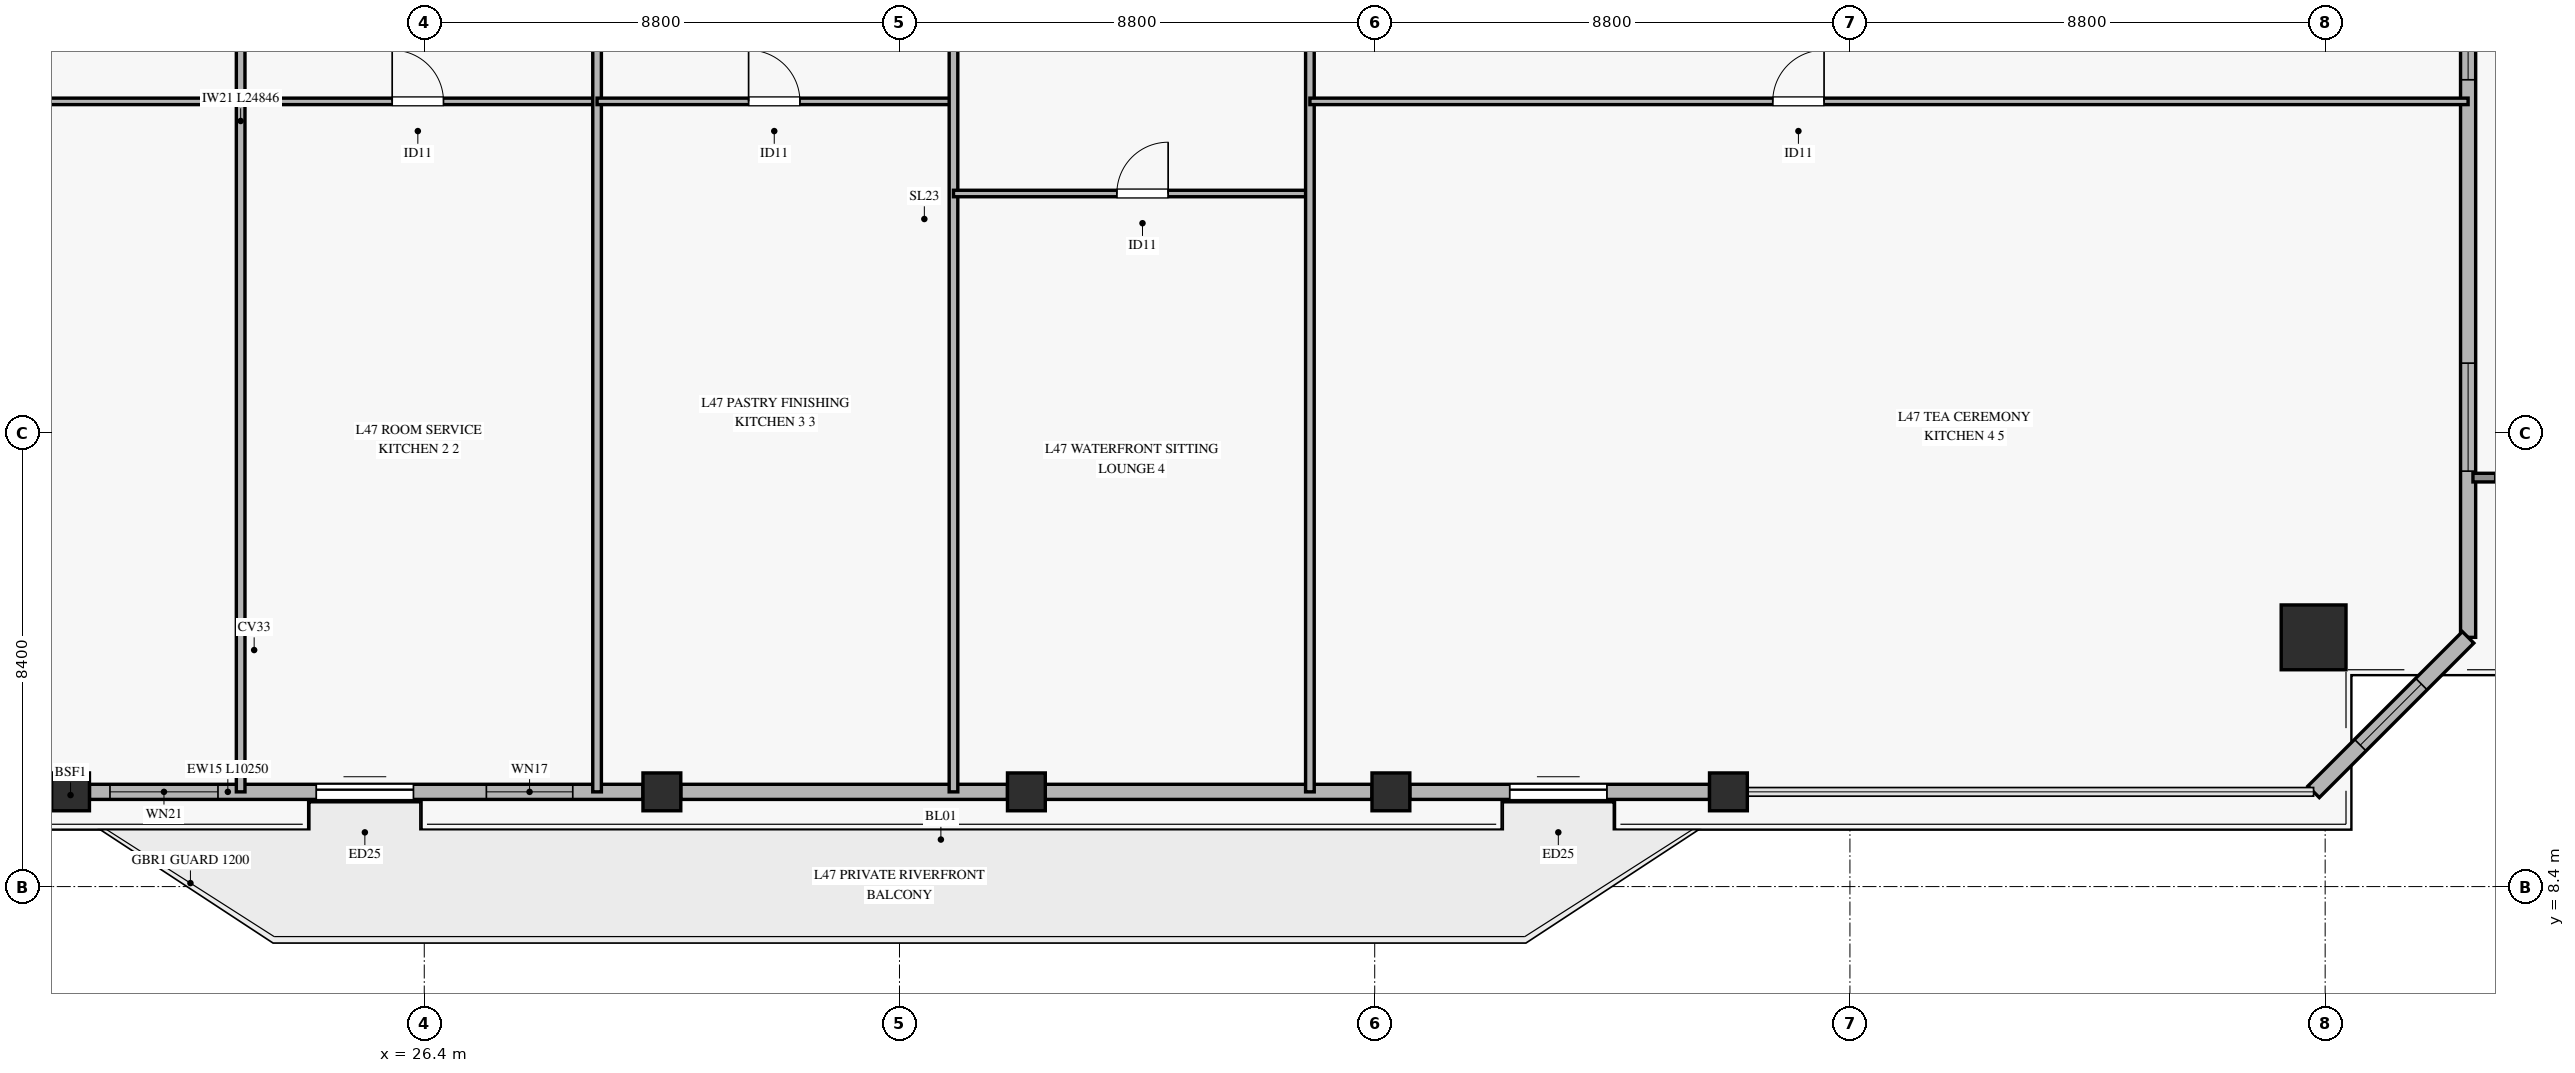
"""IFC4 building model, lengths in metres.
Left out: names, types, materials, properties, quantities, classifications, styles, units other than length and angle.
Written with IfcOpenShell. Run it as: python <this file> out.ifc"""

import sys

from ifc_helpers import new_model, si_unit, direction, frame, frame_2d, origin, origin_2d, place, context, subcontext, project, spatial, rectangle, hollow_rectangle, extrude, source, transform, mapped, element, fill, save


model = new_model("IFC4")
c1 = context("Model", 3, precision=1e-05, world=origin(), true_north=direction((0.0, 1.0)))
c2 = subcontext(c1, "Body", "Model", "MODEL_VIEW")
j1 = project(units=[si_unit("LENGTHUNIT", "METRE"), si_unit("PLANEANGLEUNIT", "RADIAN")], contexts=[c1])
p1 = place(None, origin())
s1 = spatial("IfcSite", under=j1, at=p1, CompositionType="ELEMENT")
p2 = place(p1, origin())
s2 = spatial("IfcBuilding", under=s1, at=p2, CompositionType="ELEMENT")
p3 = place(p2, frame((0.0, 0.0, 187.7)))
s3 = spatial("IfcBuildingStorey", under=s2, at=p3, CompositionType="ELEMENT", Elevation=187.7)
m1 = source(origin(), c2, "Body", "SweptSolid", [
    extrude(hollow_rectangle(XDim=1.2, YDim=1.2, WallThickness=0.055, at=origin_2d()), origin(), (0.0, 0.0, 1.0), 3.265),
])
p4 = place(p3, frame((61.386, 13.015, 0.0), z_axis=(-0.06400248014, 0.15312742912, 0.986131671222), x_axis=(-0.922649834668, -0.385638798084, 0.0)))
e1 = element("IfcColumn", 1, at=p4, inside=s3, PredefinedType="COLUMN", context=c2, shape_type="MappedRepresentation", body=[
    mapped(m1, transform((0.0, 0.0, 0.0), x_axis=(1.0, 0.0, 0.0), y_axis=(0.0, 1.0, 0.0), z_axis=(0.0, 0.0, 1.0), scale=1.0)),
])
m2 = source(origin(), c2, "Body", "SweptSolid", [
    extrude(hollow_rectangle(XDim=0.7, YDim=0.7, WallThickness=0.032, at=origin_2d()), origin(), (0.0, 0.0, 1.0), 3.263),
])
for number, where, z_axis, x_axis in (
    (2, (19.85, 10.154, 0.0), (0.0, 0.161, 0.987), (-1.0, 0.0, 0.0)),
    (3, (30.8, 10.154, 0.0), (0.0, 0.161, 0.987), (-1.0, 0.0, 0.0)),
    (4, (37.55, 10.154, 0.0), (0.0, 0.161, 0.987), (-1.0, 0.0, 0.0)),
    (5, (44.3, 10.154, 0.0), (0.0, 0.161, 0.987), (-1.0, 0.0, 0.0)),
    (6, (50.55, 10.154, 0.0), (0.0, 0.161, 0.987), (-1.0, 0.0, 0.0)),
):
    element("IfcColumn", number, at=place(p3, frame(where, z_axis=z_axis, x_axis=x_axis)), inside=s3, PredefinedType="COLUMN", context=c2, shape_type="MappedRepresentation", body=[
        mapped(m2, transform((0.0, 0.0, 0.0), x_axis=(1.0, 0.0, 0.0), y_axis=(0.0, 1.0, 0.0), z_axis=(0.0, 0.0, 1.0), scale=1.0)),
    ])
p5 = place(p3, frame((20.2, 10.154, 0.0), z_axis=(0.0, 0.0, 1.0), x_axis=(1.0, 0.0, 0.0)))
e7 = element("IfcWall", 7, at=p5, inside=s3, PredefinedType="SOLIDWALL", context=c2, shape_type="SweptSolid", body=[
    extrude(rectangle(XDim=10.25, YDim=0.28, at=frame_2d((5.125, 0.0))), origin(), (0.0, 0.0, 1.0), 2.7),
])
p6 = place(p5, frame((4.2, 0.0, 0.0)))
e8 = element("IfcOpeningElement", 8, at=p6, cuts=e7, PredefinedType="OPENING", context=c2, shape_type="SweptSolid", body=[
    extrude(rectangle(XDim=1.8, YDim=2.25, at=frame_2d((0.9, 1.125))), frame((0.0, 0.15, 0.0), z_axis=(0.0, -1.0, 0.0), x_axis=(1.0, 0.0, 0.0)), (0.0, 0.0, 1.0), 0.3),
])
p7 = place(p5, frame((0.38, 0.0, 0.35)))
e9 = element("IfcOpeningElement", 9, at=p7, cuts=e7, PredefinedType="OPENING", context=c2, shape_type="SweptSolid", body=[
    extrude(rectangle(XDim=2.0, YDim=2.0, at=frame_2d((1.0, 1.0))), frame((0.0, 0.15, 0.0), z_axis=(0.0, -1.0, 0.0), x_axis=(1.0, 0.0, 0.0)), (0.0, 0.0, 1.0), 0.3),
])
p8 = place(p5, frame((7.35, 0.0, 0.35)))
e10 = element("IfcOpeningElement", 10, at=p8, cuts=e7, PredefinedType="OPENING", context=c2, shape_type="SweptSolid", body=[
    extrude(rectangle(XDim=1.6, YDim=2.0, at=frame_2d((0.8, 1.0))), frame((0.0, 0.15, 0.0), z_axis=(0.0, -1.0, 0.0), x_axis=(1.0, 0.0, 0.0)), (0.0, 0.0, 1.0), 0.3),
])
for number, where, z_axis, x_axis in (
    (11, (31.15, 10.154, 0.0), (0.0, 0.0, 1.0), (1.0, 0.0, 0.0)),
    (12, (37.9, 10.154, 0.0), (0.0, 0.0, 1.0), (1.0, 0.0, 0.0)),
):
    element("IfcWall", number, at=place(p3, frame(where, z_axis=z_axis, x_axis=x_axis)), inside=s3, PredefinedType="SOLIDWALL", context=c2, shape_type="SweptSolid", body=[
        extrude(rectangle(XDim=6.05, YDim=0.28, at=frame_2d((3.025, 0.0))), origin(), (0.0, 0.0, 1.0), 2.7),
    ])
p9 = place(p3, frame((44.65, 10.154, 0.0), z_axis=(0.0, 0.0, 1.0), x_axis=(1.0, 0.0, 0.0)))
e13 = element("IfcWall", 13, at=p9, inside=s3, PredefinedType="SOLIDWALL", context=c2, shape_type="SweptSolid", body=[
    extrude(rectangle(XDim=5.55, YDim=0.28, at=frame_2d((2.775, 0.0))), origin(), (0.0, 0.0, 1.0), 2.7),
])
p10 = place(p9, frame((1.85, 0.0, 0.0)))
e14 = element("IfcOpeningElement", 14, at=p10, cuts=e13, PredefinedType="OPENING", context=c2, shape_type="SweptSolid", body=[
    extrude(rectangle(XDim=1.8, YDim=2.25, at=frame_2d((0.9, 1.125))), frame((0.0, 0.15, 0.0), z_axis=(0.0, -1.0, 0.0), x_axis=(1.0, 0.0, 0.0)), (0.0, 0.0, 1.0), 0.3),
])
p11 = place(p3, frame((64.247, 13.015, 0.0), z_axis=(0.0, 0.0, 1.0), x_axis=(0.0, 1.0, 0.0)))
e15 = element("IfcWall", 15, at=p11, inside=s3, PredefinedType="SOLIDWALL", context=c2, shape_type="SweptSolid", body=[
    extrude(rectangle(XDim=14.762, YDim=0.28, at=frame_2d((7.381, 0.0))), origin(), (0.0, 0.0, 1.0), 2.7),
])
p12 = place(p11, frame((3.078, 0.0, 0.45)))
e16 = element("IfcOpeningElement", 16, at=p12, cuts=e15, PredefinedType="OPENING", context=c2, shape_type="SweptSolid", body=[
    extrude(rectangle(XDim=2.0, YDim=2.0, at=frame_2d((1.0, 1.0))), frame((0.0, 0.15, 0.0), z_axis=(0.0, -1.0, 0.0), x_axis=(1.0, 0.0, 0.0)), (0.0, 0.0, 1.0), 0.3),
])
p13 = place(p11, frame((10.325, 0.0, 0.45)))
e17 = element("IfcOpeningElement", 17, at=p13, cuts=e15, PredefinedType="OPENING", context=c2, shape_type="SweptSolid", body=[
    extrude(rectangle(XDim=2.0, YDim=2.0, at=frame_2d((1.0, 1.0))), frame((0.0, 0.15, 0.0), z_axis=(0.0, -1.0, 0.0), x_axis=(1.0, 0.0, 0.0)), (0.0, 0.0, 1.0), 0.3),
])
p14 = place(p3, frame((61.386, 10.154, 0.0), z_axis=(0.0, 0.0, 1.0), x_axis=(0.707136951076, 0.70707661001, 0.0)))
e18 = element("IfcWall", 18, at=p14, inside=s3, PredefinedType="SOLIDWALL", context=c2, shape_type="SweptSolid", body=[
    extrude(rectangle(XDim=4.046, YDim=0.3, at=frame_2d((2.023, 0.0))), origin(), (0.0, 0.0, 1.0), 2.7),
])
p15 = place(p14, frame((1.223, 0.0, 0.45)))
e19 = element("IfcOpeningElement", 19, at=p15, cuts=e18, PredefinedType="OPENING", context=c2, shape_type="SweptSolid", body=[
    extrude(rectangle(XDim=1.6, YDim=2.0, at=frame_2d((0.8, 1.0))), frame((0.0, 0.16, 0.0), z_axis=(0.0, -1.0, 0.0), x_axis=(1.0, 0.0, 0.0)), (0.0, 0.0, 1.0), 0.32),
])
p16 = place(p3, frame((6.154, 22.94, 0.0), z_axis=(0.0, 0.0, 1.0), x_axis=(1.0, 0.0, 0.0)))
e20 = element("IfcWall", 20, at=p16, inside=s3, PredefinedType="PARTITIONING", context=c2, shape_type="SweptSolid", body=[
    extrude(rectangle(XDim=16.846, YDim=0.12, at=frame_2d((8.423, 0.0))), origin(), (0.0, 0.0, 1.0), 2.405),
])
p17 = place(p16, frame((7.165, 0.0, 0.0)))
e21 = element("IfcOpeningElement", 21, at=p17, cuts=e20, PredefinedType="OPENING", context=c2, shape_type="SweptSolid", body=[
    extrude(rectangle(XDim=0.95, YDim=2.1, at=frame_2d((0.475, 1.05))), frame((0.0, 0.07, 0.0), z_axis=(0.0, -1.0, 0.0), x_axis=(1.0, 0.0, 0.0)), (0.0, 0.0, 1.0), 0.14),
])
p18 = place(p3, frame((23.0, 10.154, 0.0), z_axis=(0.0, 0.0, 1.0), x_axis=(0.0, 1.0, 0.0)))
e22 = element("IfcWall", 22, at=p18, inside=s3, PredefinedType="PARTITIONING", context=c2, shape_type="SweptSolid", body=[
    extrude(rectangle(XDim=24.846, YDim=0.16, at=frame_2d((12.423, 0.0))), origin(), (0.0, 0.0, 1.0), 2.705),
])
p19 = place(p3, frame((23.0, 22.94, 0.0), z_axis=(0.0, 0.0, 1.0), x_axis=(1.0, 0.0, 0.0)))
e23 = element("IfcWall", 23, at=p19, inside=s3, PredefinedType="PARTITIONING", context=c2, shape_type="SweptSolid", body=[
    extrude(rectangle(XDim=6.6, YDim=0.12, at=frame_2d((3.3, 0.0))), origin(), (0.0, 0.0, 1.0), 3.22),
])
p20 = place(p19, frame((2.806, 0.0, 0.0)))
e24 = element("IfcOpeningElement", 24, at=p20, cuts=e23, PredefinedType="OPENING", context=c2, shape_type="SweptSolid", body=[
    extrude(rectangle(XDim=0.95, YDim=2.1, at=frame_2d((0.475, 1.05))), frame((0.0, 0.07, 0.0), z_axis=(0.0, -1.0, 0.0), x_axis=(1.0, 0.0, 0.0)), (0.0, 0.0, 1.0), 0.14),
])
p21 = place(p3, frame((29.6, 10.154, 0.0), z_axis=(0.0, 0.0, 1.0), x_axis=(0.0, 1.0, 0.0)))
e25 = element("IfcWall", 25, at=p21, inside=s3, PredefinedType="PARTITIONING", context=c2, shape_type="SweptSolid", body=[
    extrude(rectangle(XDim=24.846, YDim=0.16, at=frame_2d((12.423, 0.0))), origin(), (0.0, 0.0, 1.0), 2.705),
])
p22 = place(p3, frame((29.6, 22.94, 0.0), z_axis=(0.0, 0.0, 1.0), x_axis=(1.0, 0.0, 0.0)))
e26 = element("IfcWall", 26, at=p22, inside=s3, PredefinedType="PARTITIONING", context=c2, shape_type="SweptSolid", body=[
    extrude(rectangle(XDim=6.6, YDim=0.12, at=frame_2d((3.3, 0.0))), origin(), (0.0, 0.0, 1.0), 2.405),
])
p23 = place(p22, frame((2.806, 0.0, 0.0)))
e27 = element("IfcOpeningElement", 27, at=p23, cuts=e26, PredefinedType="OPENING", context=c2, shape_type="SweptSolid", body=[
    extrude(rectangle(XDim=0.95, YDim=2.1, at=frame_2d((0.475, 1.05))), frame((0.0, 0.07, 0.0), z_axis=(0.0, -1.0, 0.0), x_axis=(1.0, 0.0, 0.0)), (0.0, 0.0, 1.0), 0.14),
])
p24 = place(p3, frame((36.2, 10.154, 0.0), z_axis=(0.0, 0.0, 1.0), x_axis=(0.0, 1.0, 0.0)))
e28 = element("IfcWall", 28, at=p24, inside=s3, PredefinedType="PARTITIONING", context=c2, shape_type="SweptSolid", body=[
    extrude(rectangle(XDim=24.846, YDim=0.16, at=frame_2d((12.423, 0.0))), origin(), (0.0, 0.0, 1.0), 2.705),
])
p25 = place(p3, frame((36.2, 21.234, 0.0), z_axis=(0.0, 0.0, 1.0), x_axis=(1.0, 0.0, 0.0)))
e29 = element("IfcWall", 29, at=p25, inside=s3, PredefinedType="PARTITIONING", context=c2, shape_type="SweptSolid", body=[
    extrude(rectangle(XDim=6.6, YDim=0.12, at=frame_2d((3.3, 0.0))), origin(), (0.0, 0.0, 1.0), 2.405),
])
p26 = place(p25, frame((3.025, 0.0, 0.0)))
e30 = element("IfcOpeningElement", 30, at=p26, cuts=e29, PredefinedType="OPENING", context=c2, shape_type="SweptSolid", body=[
    extrude(rectangle(XDim=0.95, YDim=2.1, at=frame_2d((0.475, 1.05))), frame((0.0, 0.07, 0.0), z_axis=(0.0, -1.0, 0.0), x_axis=(1.0, 0.0, 0.0)), (0.0, 0.0, 1.0), 0.14),
])
p27 = place(p3, frame((42.8, 10.154, 0.0), z_axis=(0.0, 0.0, 1.0), x_axis=(0.0, 1.0, 0.0)))
e31 = element("IfcWall", 31, at=p27, inside=s3, PredefinedType="PARTITIONING", context=c2, shape_type="SweptSolid", body=[
    extrude(rectangle(XDim=24.846, YDim=0.16, at=frame_2d((12.423, 0.0))), origin(), (0.0, 0.0, 1.0), 2.705),
])
p28 = place(p3, frame((42.8, 22.94, 0.0), z_axis=(0.0, 0.0, 1.0), x_axis=(1.0, 0.0, 0.0)))
e32 = element("IfcWall", 32, at=p28, inside=s3, PredefinedType="PARTITIONING", context=c2, shape_type="SweptSolid", body=[
    extrude(rectangle(XDim=21.447, YDim=0.12, at=frame_2d((10.724, 0.0))), origin(), (0.0, 0.0, 1.0), 2.405),
])
p29 = place(p28, frame((8.571, 0.0, 0.0)))
e33 = element("IfcOpeningElement", 33, at=p29, cuts=e32, PredefinedType="OPENING", context=c2, shape_type="SweptSolid", body=[
    extrude(rectangle(XDim=0.95, YDim=2.1, at=frame_2d((0.475, 1.05))), frame((0.0, 0.07, 0.0), z_axis=(0.0, -1.0, 0.0), x_axis=(1.0, 0.0, 0.0)), (0.0, 0.0, 1.0), 0.14),
])
m3 = source(origin(), c2, "Body", "SweptSolid", [
    extrude(rectangle(XDim=1.8, YDim=2.25, at=frame_2d((0.9, 1.125))), frame((0.0, 0.025, 0.0), z_axis=(0.0, -1.0, 0.0), x_axis=(1.0, 0.0, 0.0)), (0.0, 0.0, 1.0), 0.05),
])
p30 = place(p6, origin())
e34 = element("IfcDoor", 34, at=p30, inside=s3, OperationType="SLIDING_TO_LEFT", PredefinedType="DOOR", context=c2, shape_type="MappedRepresentation", body=[
    mapped(m3, transform((0.0, 0.0, 0.0), x_axis=(1.0, 0.0, 0.0), y_axis=(0.0, 1.0, 0.0), z_axis=(0.0, 0.0, 1.0), scale=1.0)),
])
fill(e8, e34)
m4 = source(origin(), c2, "Body", "SweptSolid", [
    extrude(rectangle(XDim=2.0, YDim=2.0, at=frame_2d((1.0, 1.0))), frame((0.0, 0.03, 0.0), z_axis=(0.0, -1.0, 0.0), x_axis=(1.0, 0.0, 0.0)), (0.0, 0.0, 1.0), 0.06),
])
p31 = place(p7, origin())
e35 = element("IfcWindow", 35, at=p31, inside=s3, PartitioningType="SINGLE_PANEL", PredefinedType="WINDOW", context=c2, shape_type="MappedRepresentation", body=[
    mapped(m4, transform((0.0, 0.0, 0.0), x_axis=(1.0, 0.0, 0.0), y_axis=(0.0, 1.0, 0.0), z_axis=(0.0, 0.0, 1.0), scale=1.0)),
])
fill(e9, e35)
m5 = source(origin(), c2, "Body", "SweptSolid", [
    extrude(rectangle(XDim=1.6, YDim=2.0, at=frame_2d((0.8, 1.0))), frame((0.0, 0.03, 0.0), z_axis=(0.0, -1.0, 0.0), x_axis=(1.0, 0.0, 0.0)), (0.0, 0.0, 1.0), 0.06),
])
p32 = place(p8, origin())
e36 = element("IfcWindow", 36, at=p32, inside=s3, PartitioningType="SINGLE_PANEL", PredefinedType="WINDOW", context=c2, shape_type="MappedRepresentation", body=[
    mapped(m5, transform((0.0, 0.0, 0.0), x_axis=(1.0, 0.0, 0.0), y_axis=(0.0, 1.0, 0.0), z_axis=(0.0, 0.0, 1.0), scale=1.0)),
])
fill(e10, e36)
p33 = place(p10, origin())
e37 = element("IfcDoor", 37, at=p33, inside=s3, OperationType="SLIDING_TO_LEFT", PredefinedType="DOOR", context=c2, shape_type="MappedRepresentation", body=[
    mapped(m3, transform((0.0, 0.0, 0.0), x_axis=(1.0, 0.0, 0.0), y_axis=(0.0, 1.0, 0.0), z_axis=(0.0, 0.0, 1.0), scale=1.0)),
])
fill(e14, e37)
p34 = place(p12, origin())
e38 = element("IfcWindow", 38, at=p34, inside=s3, PartitioningType="SINGLE_PANEL", PredefinedType="WINDOW", context=c2, shape_type="MappedRepresentation", body=[
    mapped(m4, transform((0.0, 0.0, 0.0), x_axis=(1.0, 0.0, 0.0), y_axis=(0.0, 1.0, 0.0), z_axis=(0.0, 0.0, 1.0), scale=1.0)),
])
fill(e16, e38)
p35 = place(p13, origin())
e39 = element("IfcWindow", 39, at=p35, inside=s3, PartitioningType="SINGLE_PANEL", PredefinedType="WINDOW", context=c2, shape_type="MappedRepresentation", body=[
    mapped(m4, transform((0.0, 0.0, 0.0), x_axis=(1.0, 0.0, 0.0), y_axis=(0.0, 1.0, 0.0), z_axis=(0.0, 0.0, 1.0), scale=1.0)),
])
fill(e17, e39)
p36 = place(p15, origin())
e40 = element("IfcWindow", 40, at=p36, inside=s3, PartitioningType="SINGLE_PANEL", PredefinedType="WINDOW", context=c2, shape_type="MappedRepresentation", body=[
    mapped(m5, transform((0.0, 0.0, 0.0), x_axis=(1.0, 0.0, 0.0), y_axis=(0.0, 1.0, 0.0), z_axis=(0.0, 0.0, 1.0), scale=1.0)),
])
fill(e19, e40)
m6 = source(origin(), c2, "Body", "SweptSolid", [
    extrude(rectangle(XDim=0.95, YDim=2.1, at=frame_2d((0.475, 1.05))), frame((0.0, 0.025, 0.0), z_axis=(0.0, -1.0, 0.0), x_axis=(1.0, 0.0, 0.0)), (0.0, 0.0, 1.0), 0.05),
])
p37 = place(p20, origin())
e41 = element("IfcDoor", 41, at=p37, inside=s3, OperationType="SINGLE_SWING_LEFT", PredefinedType="DOOR", context=c2, shape_type="MappedRepresentation", body=[
    mapped(m6, transform((0.0, 0.0, 0.0), x_axis=(1.0, 0.0, 0.0), y_axis=(0.0, 1.0, 0.0), z_axis=(0.0, 0.0, 1.0), scale=1.0)),
])
fill(e24, e41)
p38 = place(p23, origin())
e42 = element("IfcDoor", 42, at=p38, inside=s3, OperationType="SINGLE_SWING_LEFT", PredefinedType="DOOR", context=c2, shape_type="MappedRepresentation", body=[
    mapped(m6, transform((0.0, 0.0, 0.0), x_axis=(1.0, 0.0, 0.0), y_axis=(0.0, 1.0, 0.0), z_axis=(0.0, 0.0, 1.0), scale=1.0)),
])
fill(e27, e42)
p39 = place(p26, origin())
e43 = element("IfcDoor", 43, at=p39, inside=s3, OperationType="SINGLE_SWING_RIGHT", PredefinedType="DOOR", context=c2, shape_type="MappedRepresentation", body=[
    mapped(m6, transform((0.0, 0.0, 0.0), x_axis=(1.0, 0.0, 0.0), y_axis=(0.0, 1.0, 0.0), z_axis=(0.0, 0.0, 1.0), scale=1.0)),
])
fill(e30, e43)
p40 = place(p29, origin())
e44 = element("IfcDoor", 44, at=p40, inside=s3, OperationType="SINGLE_SWING_RIGHT", PredefinedType="DOOR", context=c2, shape_type="MappedRepresentation", body=[
    mapped(m6, transform((0.0, 0.0, 0.0), x_axis=(1.0, 0.0, 0.0), y_axis=(0.0, 1.0, 0.0), z_axis=(0.0, 0.0, 1.0), scale=1.0)),
])
fill(e33, e44)
save(model, sys.argv[1])
